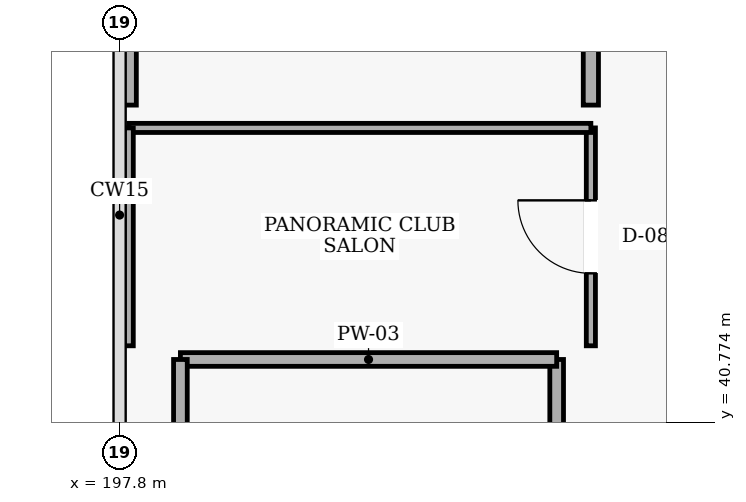
"""IFC4 building model, lengths in metres.
Left out: names, types, materials, properties, quantities, classifications, styles, units other than length and angle.
Written with IfcOpenShell. Run it as: python <this file> out.ifc"""

import sys

from ifc_helpers import new_model, si_unit, direction, frame, frame_2d, origin, place, context, subcontext, project, spatial, rectangle, extrude, element, fill, save


model = new_model("IFC4")
c1 = context("Model", 3, precision=1e-05, world=origin(), true_north=direction((0.0, 1.0)))
c2 = subcontext(c1, "Body", "Model", "MODEL_VIEW")
j1 = project(units=[si_unit("LENGTHUNIT", "METRE"), si_unit("PLANEANGLEUNIT", "RADIAN")], contexts=[c1])
p1 = place(None, origin())
s1 = spatial("IfcSite", under=j1, at=p1, CompositionType="ELEMENT")
p2 = place(p1, origin())
s2 = spatial("IfcBuilding", under=s1, at=p2, CompositionType="ELEMENT")
p3 = place(p2, frame((0.0, 0.0, 24.6)))
s3 = spatial("IfcBuildingStorey", under=s2, at=p3, CompositionType="ELEMENT", Elevation=24.6)
p4 = place(p3, frame((203.55, 38.2, 0.0), z_axis=(0.0, 0.0, 1.0), x_axis=(0.0, 1.0, 0.0)))
e1 = element("IfcWall", 1, at=p4, inside=s3, PredefinedType="PARTITIONING", context=c2, shape_type="SweptSolid", body=[
    extrude(rectangle(XDim=3.4, YDim=0.18, at=frame_2d((1.7, 0.0))), origin(), (0.0, 0.0, 1.0), 4.5),
])
p5 = place(p4, frame((1.24, 0.0, 0.0)))
e2 = element("IfcOpeningElement", 2, at=p5, cuts=e1, PredefinedType="OPENING", context=c2, shape_type="SweptSolid", body=[
    extrude(rectangle(XDim=0.92, YDim=2.1, at=frame_2d((0.46, 1.05))), frame((0.0, 0.1, 0.0), z_axis=(0.0, -1.0, 0.0), x_axis=(1.0, 0.0, 0.0)), (0.0, 0.0, 1.0), 0.2),
])
p6 = place(p3, frame((203.55, 41.6, 0.0), z_axis=(0.0, 0.0, 1.0), x_axis=(-1.0, 0.0, 0.0)))
e3 = element("IfcWall", 3, at=p6, inside=s3, PredefinedType="PARTITIONING", context=c2, shape_type="SweptSolid", body=[
    extrude(rectangle(XDim=4.95, YDim=0.18, at=frame_2d((2.475, 0.0))), origin(), (0.0, 0.0, 1.0), 4.5),
])
p7 = place(p3, frame((198.6, 41.6, 0.0), z_axis=(0.0, 0.0, 1.0), x_axis=(0.0, -1.0, 0.0)))
e4 = element("IfcWall", 4, at=p7, inside=s3, PredefinedType="PARTITIONING", context=c2, shape_type="SweptSolid", body=[
    extrude(rectangle(XDim=3.4, YDim=0.18, at=frame_2d((1.7, 0.0))), origin(), (0.0, 0.0, 1.0), 4.5),
])
p8 = place(p3, frame((204.0, 41.78, 0.0), z_axis=(0.0, 0.0, 1.0), x_axis=(0.0, 1.0, 0.0)))
e5 = element("IfcWall", 5, at=p8, inside=s3, PredefinedType="PARTITIONING", context=c2, shape_type="SweptSolid", body=[
    extrude(rectangle(XDim=2.866, YDim=0.12, at=frame_2d((1.433, 0.0))), origin(), (0.0, 0.0, 1.0), 4.5),
])
p9 = place(p8, frame((0.953, 0.0, 0.0)))
e6 = element("IfcOpeningElement", 6, at=p9, cuts=e5, PredefinedType="OPENING", context=c2, shape_type="SweptSolid", body=[
    extrude(rectangle(XDim=0.96, YDim=2.1, at=frame_2d((0.48, 1.05))), frame((0.0, 0.07, 0.0), z_axis=(0.0, -1.0, 0.0), x_axis=(1.0, 0.0, 0.0)), (0.0, 0.0, 1.0), 0.14),
])
p10 = place(p3, frame((204.0, 44.646, 0.0), z_axis=(0.0, 0.0, 1.0), x_axis=(-1.0, 0.0, 0.0)))
e7 = element("IfcWall", 7, at=p10, inside=s3, PredefinedType="PARTITIONING", context=c2, shape_type="SweptSolid", body=[
    extrude(rectangle(XDim=6.08, YDim=0.12, at=frame_2d((3.04, 0.0))), origin(), (0.0, 0.0, 1.0), 4.5),
])
p11 = place(p3, frame((197.92, 44.646, 0.0), z_axis=(0.0, 0.0, 1.0), x_axis=(0.0, -1.0, 0.0)))
e8 = element("IfcWall", 8, at=p11, inside=s3, PredefinedType="PARTITIONING", context=c2, shape_type="SweptSolid", body=[
    extrude(rectangle(XDim=2.866, YDim=0.12, at=frame_2d((1.433, 0.0))), origin(), (0.0, 0.0, 1.0), 3.58),
])
p12 = place(p3, frame((204.0, 44.947, 0.0), z_axis=(0.0, 0.0, 1.0), x_axis=(0.0, 1.0, 0.0)))
e9 = element("IfcWall", 9, at=p12, inside=s3, PredefinedType="PARTITIONING", context=c2, shape_type="SweptSolid", body=[
    extrude(rectangle(XDim=7.674, YDim=0.2, at=frame_2d((3.837, 0.0))), origin(), (0.0, 0.0, 1.0), 4.5),
])
p13 = place(p12, frame((2.657, 0.0, 0.0)))
e10 = element("IfcOpeningElement", 10, at=p13, cuts=e9, PredefinedType="OPENING", context=c2, shape_type="SweptSolid", body=[
    extrude(rectangle(XDim=2.36, YDim=2.4, at=frame_2d((1.18, 1.2))), frame((0.0, 0.11, 0.0), z_axis=(0.0, -1.0, 0.0), x_axis=(1.0, 0.0, 0.0)), (0.0, 0.0, 1.0), 0.22),
])
p14 = place(p3, frame((197.92, 52.62, 0.0), z_axis=(0.0, 0.0, 1.0), x_axis=(0.0, -1.0, 0.0)))
e11 = element("IfcWall", 11, at=p14, inside=s3, PredefinedType="PARTITIONING", context=c2, shape_type="SweptSolid", body=[
    extrude(rectangle(XDim=7.674, YDim=0.2, at=frame_2d((3.837, 0.0))), origin(), (0.0, 0.0, 1.0), 3.58),
])
p15 = place(p9, origin())
e12 = element("IfcDoor", 12, at=p15, inside=s3, OperationType="SINGLE_SWING_RIGHT", PredefinedType="DOOR", context=c2, shape_type="SweptSolid", body=[
    extrude(rectangle(XDim=0.96, YDim=2.1, at=frame_2d((0.48, 1.05))), frame((0.0, 0.025, 0.0), z_axis=(0.0, -1.0, 0.0), x_axis=(1.0, 0.0, 0.0)), (0.0, 0.0, 1.0), 0.05),
])
fill(e6, e12)
save(model, sys.argv[1])
